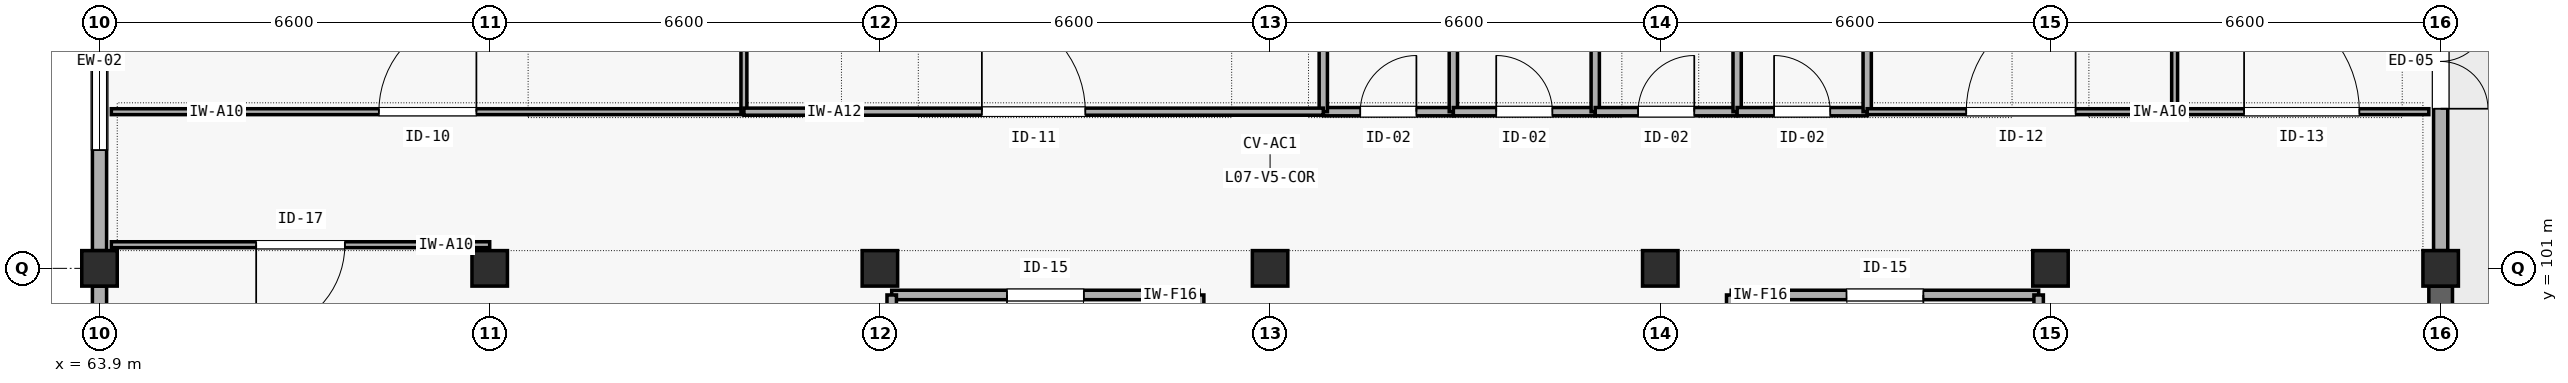
"""IFC4 building model, lengths in metres.
Left out: names, types, materials, properties, quantities, classifications, styles, units other than length and angle.
Written with IfcOpenShell. Run it as: python <this file> out.ifc"""

import sys

from ifc_helpers import new_model, si_unit, direction, frame, frame_2d, origin, origin_2d, place, context, subcontext, project, spatial, rectangle, extrude, element, fill, save


model = new_model("IFC4")
c1 = context("Model", 3, precision=1e-05, world=origin(), true_north=direction((0.0, 1.0)))
c2 = subcontext(c1, "Body", "Model", "MODEL_VIEW")
j1 = project(units=[si_unit("LENGTHUNIT", "METRE"), si_unit("PLANEANGLEUNIT", "RADIAN")], contexts=[c1])
p1 = place(None, origin())
s1 = spatial("IfcSite", under=j1, at=p1, CompositionType="ELEMENT")
p2 = place(p1, origin())
s2 = spatial("IfcBuilding", under=s1, at=p2, CompositionType="ELEMENT")
p3 = place(p2, frame((0.0, 0.0, 29.4)))
s3 = spatial("IfcBuildingStorey", under=s2, at=p3, CompositionType="ELEMENT", Elevation=29.4)
for number, where, z_axis, x_axis in (
    (1, (63.9, 101.0, 0.0), (0.0, 0.0, 1.0), (1.0, 0.0, 0.0)),
    (2, (70.5, 101.0, 0.0), (0.0, 0.0, 1.0), (1.0, 0.0, 0.0)),
    (3, (77.1, 101.0, 0.0), (0.0, 0.0, 1.0), (1.0, 0.0, 0.0)),
    (4, (83.7, 101.0, 0.0), (0.0, 0.0, 1.0), (1.0, 0.0, 0.0)),
    (5, (90.3, 101.0, 0.0), (0.0, 0.0, 1.0), (1.0, 0.0, 0.0)),
    (6, (96.9, 101.0, 0.0), (0.0, 0.0, 1.0), (1.0, 0.0, 0.0)),
    (7, (103.5, 101.0, 0.0), (0.0, 0.0, 1.0), (1.0, 0.0, 0.0)),
):
    element("IfcColumn", number, at=place(p3, frame(where, z_axis=z_axis, x_axis=x_axis)), inside=s3, PredefinedType="COLUMN", context=c2, shape_type="SweptSolid", body=[
        extrude(rectangle(XDim=0.6, YDim=0.6, at=origin_2d()), origin(), (0.0, 0.0, 1.0), 4.2),
    ])
p4 = place(p3, frame((63.9, 94.3, 0.0), z_axis=(0.0, 0.0, 1.0), x_axis=(0.0, 1.0, 0.0)))
e8 = element("IfcWall", 8, at=p4, inside=s3, PredefinedType="SOLIDWALL", context=c2, shape_type="SweptSolid", body=[
    extrude(rectangle(XDim=6.4, YDim=0.24, at=frame_2d((3.2, 0.0))), origin(), (0.0, 0.0, 1.0), 3.565),
])
p5 = place(p4, frame((2.0, 0.0, 0.85)))
e9 = element("IfcOpeningElement", 9, at=p5, cuts=e8, PredefinedType="OPENING", context=c2, shape_type="SweptSolid", body=[
    extrude(rectangle(XDim=2.4, YDim=1.5, at=frame_2d((1.2, 0.75))), frame((0.0, 0.13, 0.0), z_axis=(0.0, -1.0, 0.0), x_axis=(1.0, 0.0, 0.0)), (0.0, 0.0, 1.0), 0.26),
])
p6 = place(p3, frame((63.9, 101.3, 0.0), z_axis=(0.0, 0.0, 1.0), x_axis=(0.0, 1.0, 0.0)))
e10 = element("IfcWall", 10, at=p6, inside=s3, PredefinedType="SOLIDWALL", context=c2, shape_type="SweptSolid", body=[
    extrude(rectangle(XDim=6.4, YDim=0.24, at=frame_2d((3.2, 0.0))), origin(), (0.0, 0.0, 1.0), 3.565),
])
p7 = place(p6, frame((1.7, 0.0, 0.85)))
e11 = element("IfcOpeningElement", 11, at=p7, cuts=e10, PredefinedType="OPENING", context=c2, shape_type="SweptSolid", body=[
    extrude(rectangle(XDim=3.0, YDim=1.5, at=frame_2d((1.5, 0.75))), frame((0.0, 0.13, 0.0), z_axis=(0.0, -1.0, 0.0), x_axis=(1.0, 0.0, 0.0)), (0.0, 0.0, 1.0), 0.26),
])
p8 = place(p3, frame((103.5, 97.96, 0.0), z_axis=(0.0, 0.0, 1.0), x_axis=(0.0, 1.0, 0.0)))
e12 = element("IfcWall", 12, at=p8, inside=s3, PredefinedType="SHEAR", context=c2, shape_type="SweptSolid", body=[
    extrude(rectangle(XDim=2.74, YDim=0.4, at=frame_2d((1.37, 0.0))), origin(), (0.0, 0.0, 1.0), 3.85),
])
p9 = place(p3, frame((103.5, 101.3, 0.0), z_axis=(0.0, 0.0, 1.0), x_axis=(0.0, 1.0, 0.0)))
e13 = element("IfcWall", 13, at=p9, inside=s3, PredefinedType="SOLIDWALL", context=c2, shape_type="SweptSolid", body=[
    extrude(rectangle(XDim=6.4, YDim=0.24, at=frame_2d((3.2, 0.0))), origin(), (0.0, 0.0, 1.0), 3.505),
])
p10 = place(p9, frame((2.4, 0.0, 0.0)))
e14 = element("IfcOpeningElement", 14, at=p10, cuts=e13, PredefinedType="OPENING", context=c2, shape_type="SweptSolid", body=[
    extrude(rectangle(XDim=1.6, YDim=2.15, at=frame_2d((0.8, 1.075))), frame((0.0, 0.13, 0.0), z_axis=(0.0, -1.0, 0.0), x_axis=(1.0, 0.0, 0.0)), (0.0, 0.0, 1.0), 0.26),
])
p11 = place(p3, frame((77.3, 100.55, 0.0), z_axis=(0.0, 0.0, 1.0), x_axis=(1.0, 0.0, 0.0)))
e15 = element("IfcWall", 15, at=p11, inside=s3, PredefinedType="SOLIDWALL", context=c2, shape_type="SweptSolid", body=[
    extrude(rectangle(XDim=5.2, YDim=0.16, at=frame_2d((2.6, 0.0))), origin(), (0.0, 0.0, 1.0), 3.9),
])
p12 = place(p11, frame((1.95, 0.0, 0.0)))
e16 = element("IfcOpeningElement", 16, at=p12, cuts=e15, PredefinedType="OPENING", context=c2, shape_type="SweptSolid", body=[
    extrude(rectangle(XDim=1.3, YDim=2.15, at=frame_2d((0.65, 1.075))), frame((0.0, 0.09, 0.0), z_axis=(0.0, -1.0, 0.0), x_axis=(1.0, 0.0, 0.0)), (0.0, 0.0, 1.0), 0.18),
])
p13 = place(p3, frame((77.3, 97.5, 0.0), z_axis=(0.0, 0.0, 1.0), x_axis=(0.0, 1.0, 0.0)))
e17 = element("IfcWall", 17, at=p13, inside=s3, PredefinedType="SOLIDWALL", context=c2, shape_type="SweptSolid", body=[
    extrude(rectangle(XDim=3.05, YDim=0.16, at=frame_2d((1.525, 0.0))), origin(), (0.0, 0.0, 1.0), 3.405),
])
p14 = place(p3, frame((82.5, 97.5, 0.0), z_axis=(0.0, 0.0, 1.0), x_axis=(0.0, 1.0, 0.0)))
e18 = element("IfcWall", 18, at=p14, inside=s3, PredefinedType="SOLIDWALL", context=c2, shape_type="SweptSolid", body=[
    extrude(rectangle(XDim=3.05, YDim=0.16, at=frame_2d((1.525, 0.0))), origin(), (0.0, 0.0, 1.0), 3.9),
])
p15 = place(p3, frame((91.5, 100.55, 0.0), z_axis=(0.0, 0.0, 1.0), x_axis=(1.0, 0.0, 0.0)))
e19 = element("IfcWall", 19, at=p15, inside=s3, PredefinedType="SOLIDWALL", context=c2, shape_type="SweptSolid", body=[
    extrude(rectangle(XDim=5.2, YDim=0.16, at=frame_2d((2.6, 0.0))), origin(), (0.0, 0.0, 1.0), 3.9),
])
p16 = place(p15, frame((1.95, 0.0, 0.0)))
e20 = element("IfcOpeningElement", 20, at=p16, cuts=e19, PredefinedType="OPENING", context=c2, shape_type="SweptSolid", body=[
    extrude(rectangle(XDim=1.3, YDim=2.15, at=frame_2d((0.65, 1.075))), frame((0.0, 0.09, 0.0), z_axis=(0.0, -1.0, 0.0), x_axis=(1.0, 0.0, 0.0)), (0.0, 0.0, 1.0), 0.18),
])
p17 = place(p3, frame((91.5, 97.5, 0.0), z_axis=(0.0, 0.0, 1.0), x_axis=(0.0, 1.0, 0.0)))
e21 = element("IfcWall", 21, at=p17, inside=s3, PredefinedType="SOLIDWALL", context=c2, shape_type="SweptSolid", body=[
    extrude(rectangle(XDim=3.05, YDim=0.16, at=frame_2d((1.525, 0.0))), origin(), (0.0, 0.0, 1.0), 3.9),
])
p18 = place(p3, frame((96.7, 97.5, 0.0), z_axis=(0.0, 0.0, 1.0), x_axis=(0.0, 1.0, 0.0)))
e22 = element("IfcWall", 22, at=p18, inside=s3, PredefinedType="SOLIDWALL", context=c2, shape_type="SweptSolid", body=[
    extrude(rectangle(XDim=3.05, YDim=0.16, at=frame_2d((1.525, 0.0))), origin(), (0.0, 0.0, 1.0), 3.405),
])
p19 = place(p3, frame((84.6, 103.65, 0.0), z_axis=(0.0, 0.0, 1.0), x_axis=(1.0, 0.0, 0.0)))
e23 = element("IfcWall", 23, at=p19, inside=s3, PredefinedType="PLUMBINGWALL", context=c2, shape_type="SweptSolid", body=[
    extrude(rectangle(XDim=2.2, YDim=0.14, at=frame_2d((1.1, 0.0))), origin(), (0.0, 0.0, 1.0), 3.9),
])
p20 = place(p19, frame((0.625, 0.0, 0.0)))
e24 = element("IfcOpeningElement", 24, at=p20, cuts=e23, PredefinedType="OPENING", context=c2, shape_type="SweptSolid", body=[
    extrude(rectangle(XDim=0.95, YDim=2.1, at=frame_2d((0.475, 1.05))), frame((0.0, 0.08, 0.0), z_axis=(0.0, -1.0, 0.0), x_axis=(1.0, 0.0, 0.0)), (0.0, 0.0, 1.0), 0.16),
])
for number, where, z_axis, x_axis in (
    (25, (84.6, 103.65, 0.0), (0.0, 0.0, 1.0), (0.0, 1.0, 0.0)),
    (26, (86.8, 103.65, 0.0), (0.0, 0.0, 1.0), (0.0, 1.0, 0.0)),
):
    element("IfcWall", number, at=place(p3, frame(where, z_axis=z_axis, x_axis=x_axis)), inside=s3, PredefinedType="PLUMBINGWALL", context=c2, shape_type="SweptSolid", body=[
        extrude(rectangle(XDim=4.15, YDim=0.14, at=frame_2d((2.075, 0.0))), origin(), (0.0, 0.0, 1.0), 3.9),
    ])
p21 = place(p3, frame((86.8, 103.65, 0.0), z_axis=(0.0, 0.0, 1.0), x_axis=(1.0, 0.0, 0.0)))
e27 = element("IfcWall", 27, at=p21, inside=s3, PredefinedType="PLUMBINGWALL", context=c2, shape_type="SweptSolid", body=[
    extrude(rectangle(XDim=2.4, YDim=0.14, at=frame_2d((1.2, 0.0))), origin(), (0.0, 0.0, 1.0), 3.9),
])
p22 = place(p21, frame((0.725, 0.0, 0.0)))
e28 = element("IfcOpeningElement", 28, at=p22, cuts=e27, PredefinedType="OPENING", context=c2, shape_type="SweptSolid", body=[
    extrude(rectangle(XDim=0.95, YDim=2.1, at=frame_2d((0.475, 1.05))), frame((0.0, 0.08, 0.0), z_axis=(0.0, -1.0, 0.0), x_axis=(1.0, 0.0, 0.0)), (0.0, 0.0, 1.0), 0.16),
])
p23 = place(p3, frame((89.2, 103.65, 0.0), z_axis=(0.0, 0.0, 1.0), x_axis=(0.0, 1.0, 0.0)))
e29 = element("IfcWall", 29, at=p23, inside=s3, PredefinedType="PLUMBINGWALL", context=c2, shape_type="SweptSolid", body=[
    extrude(rectangle(XDim=4.15, YDim=0.14, at=frame_2d((2.075, 0.0))), origin(), (0.0, 0.0, 1.0), 3.9),
])
p24 = place(p3, frame((89.2, 103.65, 0.0), z_axis=(0.0, 0.0, 1.0), x_axis=(1.0, 0.0, 0.0)))
e30 = element("IfcWall", 30, at=p24, inside=s3, PredefinedType="PLUMBINGWALL", context=c2, shape_type="SweptSolid", body=[
    extrude(rectangle(XDim=2.4, YDim=0.14, at=frame_2d((1.2, 0.0))), origin(), (0.0, 0.0, 1.0), 3.9),
])
p25 = place(p24, frame((0.725, 0.0, 0.0)))
e31 = element("IfcOpeningElement", 31, at=p25, cuts=e30, PredefinedType="OPENING", context=c2, shape_type="SweptSolid", body=[
    extrude(rectangle(XDim=0.95, YDim=2.1, at=frame_2d((0.475, 1.05))), frame((0.0, 0.08, 0.0), z_axis=(0.0, -1.0, 0.0), x_axis=(1.0, 0.0, 0.0)), (0.0, 0.0, 1.0), 0.16),
])
p26 = place(p3, frame((91.6, 103.65, 0.0), z_axis=(0.0, 0.0, 1.0), x_axis=(0.0, 1.0, 0.0)))
e32 = element("IfcWall", 32, at=p26, inside=s3, PredefinedType="PLUMBINGWALL", context=c2, shape_type="SweptSolid", body=[
    extrude(rectangle(XDim=4.15, YDim=0.14, at=frame_2d((2.075, 0.0))), origin(), (0.0, 0.0, 1.0), 3.9),
])
p27 = place(p3, frame((91.6, 103.65, 0.0), z_axis=(0.0, 0.0, 1.0), x_axis=(1.0, 0.0, 0.0)))
e33 = element("IfcWall", 33, at=p27, inside=s3, PredefinedType="PLUMBINGWALL", context=c2, shape_type="SweptSolid", body=[
    extrude(rectangle(XDim=2.2, YDim=0.14, at=frame_2d((1.1, 0.0))), origin(), (0.0, 0.0, 1.0), 3.9),
])
p28 = place(p27, frame((0.625, 0.0, 0.0)))
e34 = element("IfcOpeningElement", 34, at=p28, cuts=e33, PredefinedType="OPENING", context=c2, shape_type="SweptSolid", body=[
    extrude(rectangle(XDim=0.95, YDim=2.1, at=frame_2d((0.475, 1.05))), frame((0.0, 0.08, 0.0), z_axis=(0.0, -1.0, 0.0), x_axis=(1.0, 0.0, 0.0)), (0.0, 0.0, 1.0), 0.16),
])
p29 = place(p3, frame((93.8, 103.65, 0.0), z_axis=(0.0, 0.0, 1.0), x_axis=(0.0, 1.0, 0.0)))
e35 = element("IfcWall", 35, at=p29, inside=s3, PredefinedType="PLUMBINGWALL", context=c2, shape_type="SweptSolid", body=[
    extrude(rectangle(XDim=4.15, YDim=0.14, at=frame_2d((2.075, 0.0))), origin(), (0.0, 0.0, 1.0), 3.9),
])
p30 = place(p3, frame((64.1, 103.65, 0.0), z_axis=(0.0, 0.0, 1.0), x_axis=(1.0, 0.0, 0.0)))
e36 = element("IfcWall", 36, at=p30, inside=s3, PredefinedType="PARTITIONING", context=c2, shape_type="SweptSolid", body=[
    extrude(rectangle(XDim=10.7, YDim=0.1, at=frame_2d((5.35, 0.0))), origin(), (0.0, 0.0, 1.0), 3.9),
])
p31 = place(p30, frame((4.525, 0.0, 0.0)))
e37 = element("IfcOpeningElement", 37, at=p31, cuts=e36, PredefinedType="OPENING", context=c2, shape_type="SweptSolid", body=[
    extrude(rectangle(XDim=1.65, YDim=2.25, at=frame_2d((0.825, 1.125))), frame((0.0, 0.06, 0.0), z_axis=(0.0, -1.0, 0.0), x_axis=(1.0, 0.0, 0.0)), (0.0, 0.0, 1.0), 0.12),
])
p32 = place(p3, frame((74.8, 103.65, 0.0), z_axis=(0.0, 0.0, 1.0), x_axis=(0.0, 1.0, 0.0)))
e38 = element("IfcWall", 38, at=p32, inside=s3, PredefinedType="PARTITIONING", context=c2, shape_type="SweptSolid", body=[
    extrude(rectangle(XDim=11.15, YDim=0.1, at=frame_2d((5.575, 0.0))), origin(), (0.0, 0.0, 1.0), 3.582),
])
p33 = place(p3, frame((74.8, 103.65, 0.0), z_axis=(0.0, 0.0, 1.0), x_axis=(1.0, 0.0, 0.0)))
e39 = element("IfcWall", 39, at=p33, inside=s3, PredefinedType="PARTITIONING", context=c2, shape_type="SweptSolid", body=[
    extrude(rectangle(XDim=9.8, YDim=0.12, at=frame_2d((4.9, 0.0))), origin(), (0.0, 0.0, 1.0), 3.9),
])
p34 = place(p33, frame((4.025, 0.0, 0.0)))
e40 = element("IfcOpeningElement", 40, at=p34, cuts=e39, PredefinedType="OPENING", context=c2, shape_type="SweptSolid", body=[
    extrude(rectangle(XDim=1.75, YDim=2.25, at=frame_2d((0.875, 1.125))), frame((0.0, 0.07, 0.0), z_axis=(0.0, -1.0, 0.0), x_axis=(1.0, 0.0, 0.0)), (0.0, 0.0, 1.0), 0.14),
])
p35 = place(p3, frame((93.8, 103.65, 0.0), z_axis=(0.0, 0.0, 1.0), x_axis=(1.0, 0.0, 0.0)))
e41 = element("IfcWall", 41, at=p35, inside=s3, PredefinedType="PARTITIONING", context=c2, shape_type="SweptSolid", body=[
    extrude(rectangle(XDim=5.2, YDim=0.1, at=frame_2d((2.6, 0.0))), origin(), (0.0, 0.0, 1.0), 3.9),
])
p36 = place(p35, frame((1.675, 0.0, 0.0)))
e42 = element("IfcOpeningElement", 42, at=p36, cuts=e41, PredefinedType="OPENING", context=c2, shape_type="SweptSolid", body=[
    extrude(rectangle(XDim=1.85, YDim=2.3, at=frame_2d((0.925, 1.15))), frame((0.0, 0.06, 0.0), z_axis=(0.0, -1.0, 0.0), x_axis=(1.0, 0.0, 0.0)), (0.0, 0.0, 1.0), 0.12),
])
p37 = place(p3, frame((99.0, 103.65, 0.0), z_axis=(0.0, 0.0, 1.0), x_axis=(0.0, 1.0, 0.0)))
e43 = element("IfcWall", 43, at=p37, inside=s3, PredefinedType="PARTITIONING", context=c2, shape_type="SweptSolid", body=[
    extrude(rectangle(XDim=11.15, YDim=0.1, at=frame_2d((5.575, 0.0))), origin(), (0.0, 0.0, 1.0), 3.483),
])
p38 = place(p3, frame((99.0, 103.65, 0.0), z_axis=(0.0, 0.0, 1.0), x_axis=(1.0, 0.0, 0.0)))
e44 = element("IfcWall", 44, at=p38, inside=s3, PredefinedType="PARTITIONING", context=c2, shape_type="SweptSolid", body=[
    extrude(rectangle(XDim=4.3, YDim=0.1, at=frame_2d((2.15, 0.0))), origin(), (0.0, 0.0, 1.0), 3.9),
])
p39 = place(p38, frame((1.175, 0.0, 0.0)))
e45 = element("IfcOpeningElement", 45, at=p39, cuts=e44, PredefinedType="OPENING", context=c2, shape_type="SweptSolid", body=[
    extrude(rectangle(XDim=1.95, YDim=2.3, at=frame_2d((0.975, 1.15))), frame((0.0, 0.06, 0.0), z_axis=(0.0, -1.0, 0.0), x_axis=(1.0, 0.0, 0.0)), (0.0, 0.0, 1.0), 0.12),
])
p40 = place(p3, frame((64.1, 101.4, 0.0), z_axis=(0.0, 0.0, 1.0), x_axis=(1.0, 0.0, 0.0)))
e46 = element("IfcWall", 46, at=p40, inside=s3, PredefinedType="PARTITIONING", context=c2, shape_type="SweptSolid", body=[
    extrude(rectangle(XDim=6.4, YDim=0.1, at=frame_2d((3.2, 0.0))), origin(), (0.0, 0.0, 1.0), 3.135),
])
p41 = place(p40, frame((2.45, 0.0, 0.0)))
e47 = element("IfcOpeningElement", 47, at=p41, cuts=e46, PredefinedType="OPENING", context=c2, shape_type="SweptSolid", body=[
    extrude(rectangle(XDim=1.5, YDim=2.15, at=frame_2d((0.75, 1.075))), frame((0.0, 0.06, 0.0), z_axis=(0.0, -1.0, 0.0), x_axis=(1.0, 0.0, 0.0)), (0.0, 0.0, 1.0), 0.12),
])
p42 = place(p7, origin())
e48 = element("IfcWindow", 48, at=p42, inside=s3, PartitioningType="SINGLE_PANEL", PredefinedType="WINDOW", context=c2, shape_type="SweptSolid", body=[
    extrude(rectangle(XDim=3.0, YDim=1.5, at=frame_2d((1.5, 0.75))), frame((0.0, 0.03, 0.0), z_axis=(0.0, -1.0, 0.0), x_axis=(1.0, 0.0, 0.0)), (0.0, 0.0, 1.0), 0.06),
])
fill(e11, e48)
p43 = place(p10, frame((1.6, 0.0, 0.0), z_axis=(0.0, 0.0, 1.0), x_axis=(-1.0, 0.0, 0.0)))
e49 = element("IfcDoor", 49, at=p43, inside=s3, OperationType="DOUBLE_DOOR_SINGLE_SWING", PredefinedType="DOOR", context=c2, shape_type="SweptSolid", body=[
    extrude(rectangle(XDim=1.6, YDim=2.15, at=frame_2d((0.8, 1.075))), frame((0.0, 0.025, 0.0), z_axis=(0.0, -1.0, 0.0), x_axis=(1.0, 0.0, 0.0)), (0.0, 0.0, 1.0), 0.05),
])
fill(e14, e49)
p44 = place(p12, frame((1.3, 0.0, 0.0), z_axis=(0.0, 0.0, 1.0), x_axis=(-1.0, 0.0, 0.0)))
e50 = element("IfcDoor", 50, at=p44, inside=s3, OperationType="SINGLE_SWING_RIGHT", PredefinedType="DOOR", context=c2, shape_type="SweptSolid", body=[
    extrude(rectangle(XDim=1.3, YDim=2.15, at=frame_2d((0.65, 1.075))), frame((0.0, 0.025, 0.0), z_axis=(0.0, -1.0, 0.0), x_axis=(1.0, 0.0, 0.0)), (0.0, 0.0, 1.0), 0.05),
])
fill(e16, e50)
p45 = place(p16, frame((1.3, 0.0, 0.0), z_axis=(0.0, 0.0, 1.0), x_axis=(-1.0, 0.0, 0.0)))
e51 = element("IfcDoor", 51, at=p45, inside=s3, OperationType="SINGLE_SWING_LEFT", PredefinedType="DOOR", context=c2, shape_type="SweptSolid", body=[
    extrude(rectangle(XDim=1.3, YDim=2.15, at=frame_2d((0.65, 1.075))), frame((0.0, 0.025, 0.0), z_axis=(0.0, -1.0, 0.0), x_axis=(1.0, 0.0, 0.0)), (0.0, 0.0, 1.0), 0.05),
])
fill(e20, e51)
p46 = place(p20, origin())
e52 = element("IfcDoor", 52, at=p46, inside=s3, OperationType="SINGLE_SWING_RIGHT", PredefinedType="DOOR", context=c2, shape_type="SweptSolid", body=[
    extrude(rectangle(XDim=0.95, YDim=2.1, at=frame_2d((0.475, 1.05))), frame((0.0, 0.025, 0.0), z_axis=(0.0, -1.0, 0.0), x_axis=(1.0, 0.0, 0.0)), (0.0, 0.0, 1.0), 0.05),
])
fill(e24, e52)
p47 = place(p22, origin())
e53 = element("IfcDoor", 53, at=p47, inside=s3, OperationType="SINGLE_SWING_LEFT", PredefinedType="DOOR", context=c2, shape_type="SweptSolid", body=[
    extrude(rectangle(XDim=0.95, YDim=2.1, at=frame_2d((0.475, 1.05))), frame((0.0, 0.025, 0.0), z_axis=(0.0, -1.0, 0.0), x_axis=(1.0, 0.0, 0.0)), (0.0, 0.0, 1.0), 0.05),
])
fill(e28, e53)
p48 = place(p25, origin())
e54 = element("IfcDoor", 54, at=p48, inside=s3, OperationType="SINGLE_SWING_RIGHT", PredefinedType="DOOR", context=c2, shape_type="SweptSolid", body=[
    extrude(rectangle(XDim=0.95, YDim=2.1, at=frame_2d((0.475, 1.05))), frame((0.0, 0.025, 0.0), z_axis=(0.0, -1.0, 0.0), x_axis=(1.0, 0.0, 0.0)), (0.0, 0.0, 1.0), 0.05),
])
fill(e31, e54)
p49 = place(p28, origin())
e55 = element("IfcDoor", 55, at=p49, inside=s3, OperationType="SINGLE_SWING_LEFT", PredefinedType="DOOR", context=c2, shape_type="SweptSolid", body=[
    extrude(rectangle(XDim=0.95, YDim=2.1, at=frame_2d((0.475, 1.05))), frame((0.0, 0.025, 0.0), z_axis=(0.0, -1.0, 0.0), x_axis=(1.0, 0.0, 0.0)), (0.0, 0.0, 1.0), 0.05),
])
fill(e34, e55)
p50 = place(p31, origin())
e56 = element("IfcDoor", 56, at=p50, inside=s3, OperationType="SINGLE_SWING_RIGHT", PredefinedType="DOOR", context=c2, shape_type="SweptSolid", body=[
    extrude(rectangle(XDim=1.65, YDim=2.25, at=frame_2d((0.825, 1.125))), frame((0.0, 0.025, 0.0), z_axis=(0.0, -1.0, 0.0), x_axis=(1.0, 0.0, 0.0)), (0.0, 0.0, 1.0), 0.05),
])
fill(e37, e56)
p51 = place(p34, origin())
e57 = element("IfcDoor", 57, at=p51, inside=s3, OperationType="SINGLE_SWING_LEFT", PredefinedType="DOOR", context=c2, shape_type="SweptSolid", body=[
    extrude(rectangle(XDim=1.75, YDim=2.25, at=frame_2d((0.875, 1.125))), frame((0.0, 0.025, 0.0), z_axis=(0.0, -1.0, 0.0), x_axis=(1.0, 0.0, 0.0)), (0.0, 0.0, 1.0), 0.05),
])
fill(e40, e57)
p52 = place(p36, origin())
e58 = element("IfcDoor", 58, at=p52, inside=s3, OperationType="SINGLE_SWING_RIGHT", PredefinedType="DOOR", context=c2, shape_type="SweptSolid", body=[
    extrude(rectangle(XDim=1.85, YDim=2.3, at=frame_2d((0.925, 1.15))), frame((0.0, 0.025, 0.0), z_axis=(0.0, -1.0, 0.0), x_axis=(1.0, 0.0, 0.0)), (0.0, 0.0, 1.0), 0.05),
])
fill(e42, e58)
p53 = place(p39, origin())
e59 = element("IfcDoor", 59, at=p53, inside=s3, OperationType="SINGLE_SWING_LEFT", PredefinedType="DOOR", context=c2, shape_type="SweptSolid", body=[
    extrude(rectangle(XDim=1.95, YDim=2.3, at=frame_2d((0.975, 1.15))), frame((0.0, 0.025, 0.0), z_axis=(0.0, -1.0, 0.0), x_axis=(1.0, 0.0, 0.0)), (0.0, 0.0, 1.0), 0.05),
])
fill(e45, e59)
p54 = place(p41, frame((1.5, 0.0, 0.0), z_axis=(0.0, 0.0, 1.0), x_axis=(-1.0, 0.0, 0.0)))
e60 = element("IfcDoor", 60, at=p54, inside=s3, OperationType="SINGLE_SWING_RIGHT", PredefinedType="DOOR", context=c2, shape_type="SweptSolid", body=[
    extrude(rectangle(XDim=1.5, YDim=2.15, at=frame_2d((0.75, 1.075))), frame((0.0, 0.025, 0.0), z_axis=(0.0, -1.0, 0.0), x_axis=(1.0, 0.0, 0.0)), (0.0, 0.0, 1.0), 0.05),
])
fill(e47, e60)
save(model, sys.argv[1])
